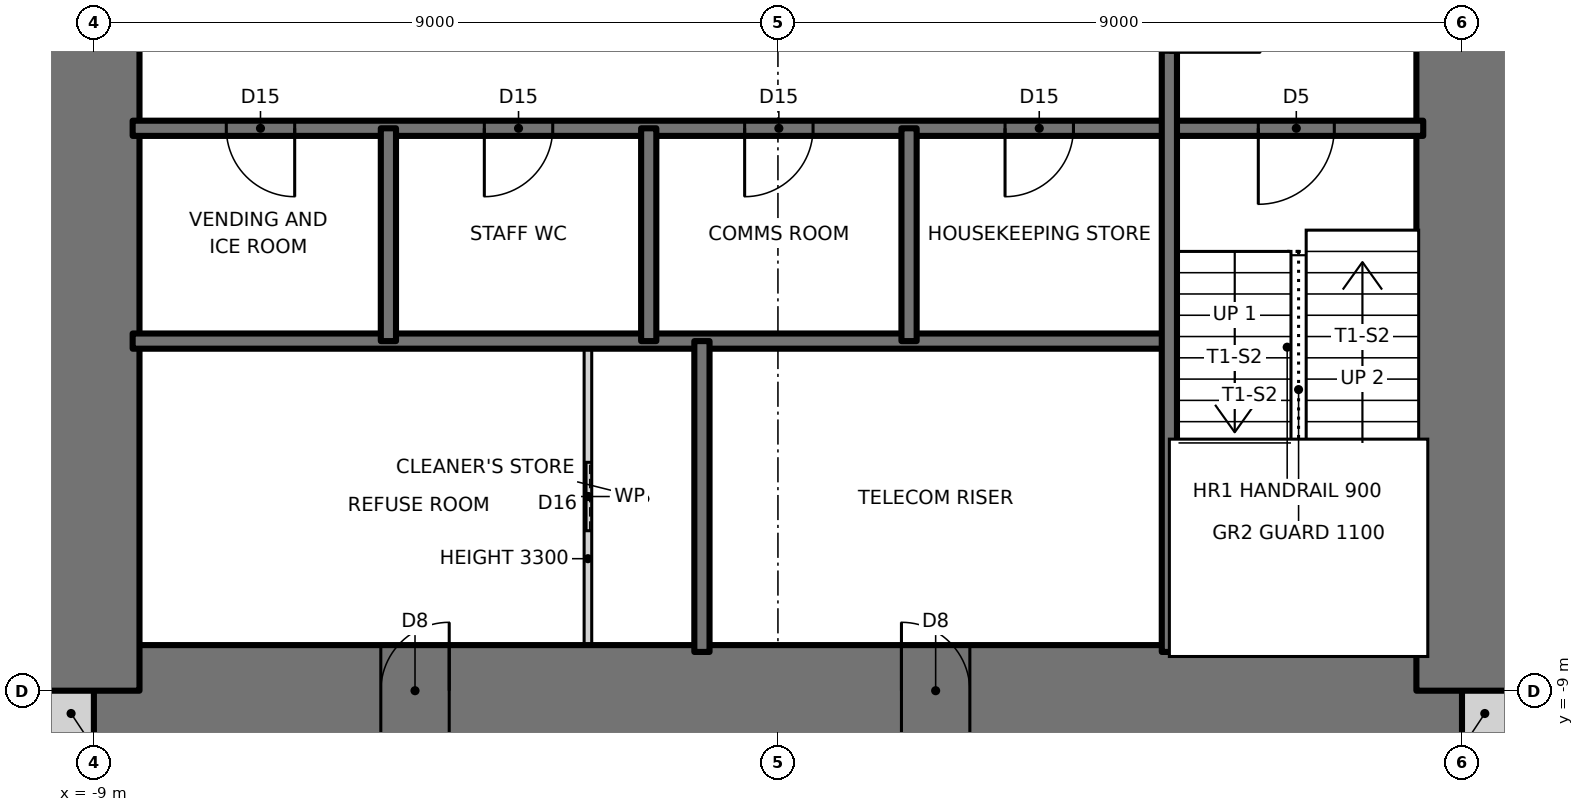
"""IFC4 building model, lengths in metres.
Left out: names, types, materials, properties, quantities, classifications, styles, units other than length and angle.
Written with IfcOpenShell. Run it as: python <this file> out.ifc"""

import sys

from ifc_helpers import new_model, si_unit, direction, frame, frame_2d, origin, place, context, subcontext, project, spatial, rectangle, extrude, element, fill, save


model = new_model("IFC4")
c1 = context("Model", 3, precision=1e-05, world=origin(), true_north=direction((0.0, 1.0)))
c2 = subcontext(c1, "Body", "Model", "MODEL_VIEW")
j1 = project(units=[si_unit("LENGTHUNIT", "METRE"), si_unit("PLANEANGLEUNIT", "RADIAN")], contexts=[c1])
p1 = place(None, origin())
s1 = spatial("IfcSite", under=j1, at=p1, CompositionType="ELEMENT")
p2 = place(p1, origin())
s2 = spatial("IfcBuilding", under=s1, at=p2, CompositionType="ELEMENT")
p3 = place(p2, frame((0.0, 0.0, 177.5)))
s3 = spatial("IfcBuildingStorey", under=s2, at=p3, CompositionType="ELEMENT", Elevation=177.5)
for number, where, z_axis, x_axis in (
    (1, (-9.6, -9.3, 0.0), (0.0, 0.0, 1.0), (1.0, 0.0, 0.0)),
    (2, (9.0, -9.3, 0.0), (0.0, 0.0, 1.0), (1.0, 0.0, 0.0)),
):
    element("IfcWall", number, at=place(p3, frame(where, z_axis=z_axis, x_axis=x_axis)), inside=s3, PredefinedType="SOLIDWALL", context=c2, shape_type="SweptSolid", body=[
        extrude(rectangle(XDim=0.6, YDim=0.6, at=frame_2d((0.3, 0.0))), origin(), (0.0, 0.0, 1.0), 3.5),
    ])
p4 = place(p3, frame((-9.0, -9.0, 0.0), z_axis=(0.0, 0.0, 1.0), x_axis=(1.0, 0.0, 0.0)))
e3 = element("IfcWall", 3, at=p4, inside=s3, PredefinedType="SHEAR", context=c2, shape_type="SweptSolid", body=[
    extrude(rectangle(XDim=18.0, YDim=1.2, at=frame_2d((9.0, 0.0))), origin(), (0.0, 0.0, 1.0), 3.5),
])
p5 = place(p4, frame((3.775, 0.0, 0.0)))
e4 = element("IfcOpeningElement", 4, at=p5, cuts=e3, PredefinedType="OPENING", context=c2, shape_type="SweptSolid", body=[
    extrude(rectangle(XDim=0.9, YDim=2.1, at=frame_2d((0.45, 1.05))), frame((0.0, 0.61, 0.0), z_axis=(0.0, -1.0, 0.0), x_axis=(1.0, 0.0, 0.0)), (0.0, 0.0, 1.0), 1.22),
])
p6 = place(p4, frame((10.625, 0.0, 0.0)))
e5 = element("IfcOpeningElement", 5, at=p6, cuts=e3, PredefinedType="OPENING", context=c2, shape_type="SweptSolid", body=[
    extrude(rectangle(XDim=0.9, YDim=2.1, at=frame_2d((0.45, 1.05))), frame((0.0, 0.61, 0.0), z_axis=(0.0, -1.0, 0.0), x_axis=(1.0, 0.0, 0.0)), (0.0, 0.0, 1.0), 1.22),
])
p7 = place(p3, frame((9.0, -9.0, 0.0), z_axis=(0.0, 0.0, 1.0), x_axis=(0.0, 1.0, 0.0)))
e6 = element("IfcWall", 6, at=p7, inside=s3, PredefinedType="SHEAR", context=c2, shape_type="SweptSolid", body=[
    extrude(rectangle(XDim=18.0, YDim=1.2, at=frame_2d((9.0, 0.0))), origin(), (0.0, 0.0, 1.0), 3.5),
])
p8 = place(p7, frame((8.5, 0.0, 0.0)))
e7 = element("IfcOpeningElement", 7, at=p8, cuts=e6, PredefinedType="OPENING", context=c2, shape_type="SweptSolid", body=[
    extrude(rectangle(XDim=1.0, YDim=2.1, at=frame_2d((0.5, 1.05))), frame((0.0, 0.61, 0.0), z_axis=(0.0, -1.0, 0.0), x_axis=(1.0, 0.0, 0.0)), (0.0, 0.0, 1.0), 1.22),
])
p9 = place(p3, frame((-9.0, 9.0, 0.0), z_axis=(0.0, 0.0, 1.0), x_axis=(0.0, -1.0, 0.0)))
e8 = element("IfcWall", 8, at=p9, inside=s3, PredefinedType="SHEAR", context=c2, shape_type="SweptSolid", body=[
    extrude(rectangle(XDim=18.0, YDim=1.2, at=frame_2d((9.0, 0.0))), origin(), (0.0, 0.0, 1.0), 3.5),
])
p10 = place(p9, frame((8.5, 0.0, 0.0)))
e9 = element("IfcOpeningElement", 9, at=p10, cuts=e8, PredefinedType="OPENING", context=c2, shape_type="SweptSolid", body=[
    extrude(rectangle(XDim=1.0, YDim=2.1, at=frame_2d((0.5, 1.05))), frame((0.0, 0.61, 0.0), z_axis=(0.0, -1.0, 0.0), x_axis=(1.0, 0.0, 0.0)), (0.0, 0.0, 1.0), 1.22),
])
p11 = place(p3, frame((-8.49, -4.4, 0.0), z_axis=(0.0, 0.0, 1.0), x_axis=(1.0, 0.0, 0.0)))
e10 = element("IfcWall", 10, at=p11, inside=s3, PredefinedType="SOLIDWALL", context=c2, shape_type="SweptSolid", body=[
    extrude(rectangle(XDim=13.64, YDim=0.2, at=frame_2d((6.82, 0.0))), origin(), (0.0, 0.0, 1.0), 3.5),
])
p12 = place(p3, frame((-8.49, -1.6, 0.0), z_axis=(0.0, 0.0, 1.0), x_axis=(1.0, 0.0, 0.0)))
e11 = element("IfcWall", 11, at=p12, inside=s3, PredefinedType="SOLIDWALL", context=c2, shape_type="SweptSolid", body=[
    extrude(rectangle(XDim=16.98, YDim=0.2, at=frame_2d((8.49, 0.0))), origin(), (0.0, 0.0, 1.0), 3.5),
])
p13 = place(p12, frame((14.81, 0.0, 0.0)))
e12 = element("IfcOpeningElement", 12, at=p13, cuts=e11, PredefinedType="OPENING", context=c2, shape_type="SweptSolid", body=[
    extrude(rectangle(XDim=1.0, YDim=2.1, at=frame_2d((0.5, 1.05))), frame((0.0, 0.11, 0.0), z_axis=(0.0, -1.0, 0.0), x_axis=(1.0, 0.0, 0.0)), (0.0, 0.0, 1.0), 0.22),
])
p14 = place(p12, frame((1.232, 0.0, 0.0)))
e13 = element("IfcOpeningElement", 13, at=p14, cuts=e11, PredefinedType="OPENING", context=c2, shape_type="SweptSolid", body=[
    extrude(rectangle(XDim=0.9, YDim=2.1, at=frame_2d((0.45, 1.05))), frame((0.0, 0.11, 0.0), z_axis=(0.0, -1.0, 0.0), x_axis=(1.0, 0.0, 0.0)), (0.0, 0.0, 1.0), 0.22),
])
p15 = place(p12, frame((4.627, 0.0, 0.0)))
e14 = element("IfcOpeningElement", 14, at=p15, cuts=e11, PredefinedType="OPENING", context=c2, shape_type="SweptSolid", body=[
    extrude(rectangle(XDim=0.9, YDim=2.1, at=frame_2d((0.45, 1.05))), frame((0.0, 0.11, 0.0), z_axis=(0.0, -1.0, 0.0), x_axis=(1.0, 0.0, 0.0)), (0.0, 0.0, 1.0), 0.22),
])
p16 = place(p12, frame((8.052, 0.0, 0.0)))
e15 = element("IfcOpeningElement", 15, at=p16, cuts=e11, PredefinedType="OPENING", context=c2, shape_type="SweptSolid", body=[
    extrude(rectangle(XDim=0.9, YDim=2.1, at=frame_2d((0.45, 1.05))), frame((0.0, 0.11, 0.0), z_axis=(0.0, -1.0, 0.0), x_axis=(1.0, 0.0, 0.0)), (0.0, 0.0, 1.0), 0.22),
])
p17 = place(p12, frame((11.478, 0.0, 0.0)))
e16 = element("IfcOpeningElement", 16, at=p17, cuts=e11, PredefinedType="OPENING", context=c2, shape_type="SweptSolid", body=[
    extrude(rectangle(XDim=0.9, YDim=2.1, at=frame_2d((0.45, 1.05))), frame((0.0, 0.11, 0.0), z_axis=(0.0, -1.0, 0.0), x_axis=(1.0, 0.0, 0.0)), (0.0, 0.0, 1.0), 0.22),
])
p18 = place(p3, frame((5.15, -8.49, 0.0), z_axis=(0.0, 0.0, 1.0), x_axis=(0.0, 1.0, 0.0)))
e17 = element("IfcWall", 17, at=p18, inside=s3, PredefinedType="SOLIDWALL", context=c2, shape_type="SweptSolid", body=[
    extrude(rectangle(XDim=13.09, YDim=0.2, at=frame_2d((6.545, 0.0))), origin(), (0.0, 0.0, 1.0), 3.5),
])
p19 = place(p18, frame((7.89, 0.0, 0.0)))
e18 = element("IfcOpeningElement", 18, at=p19, cuts=e17, PredefinedType="OPENING", context=c2, shape_type="SweptSolid", body=[
    extrude(rectangle(XDim=1.2, YDim=2.1, at=frame_2d((0.6, 1.05))), frame((0.0, 0.11, 0.0), z_axis=(0.0, -1.0, 0.0), x_axis=(1.0, 0.0, 0.0)), (0.0, 0.0, 1.0), 0.22),
])
p20 = place(p3, frame((1.725, -4.4, 0.0), z_axis=(0.0, 0.0, 1.0), x_axis=(0.0, 1.0, 0.0)))
e19 = element("IfcWall", 19, at=p20, inside=s3, PredefinedType="SOLIDWALL", context=c2, shape_type="SweptSolid", body=[
    extrude(rectangle(XDim=2.8, YDim=0.2, at=frame_2d((1.4, 0.0))), origin(), (0.0, 0.0, 1.0), 3.5),
])
p21 = place(p3, frame((-1.0, -8.49, 0.0), z_axis=(0.0, 0.0, 1.0), x_axis=(0.0, 1.0, 0.0)))
e20 = element("IfcWall", 20, at=p21, inside=s3, PredefinedType="SOLIDWALL", context=c2, shape_type="SweptSolid", body=[
    extrude(rectangle(XDim=4.09, YDim=0.2, at=frame_2d((2.045, 0.0))), origin(), (0.0, 0.0, 1.0), 3.5),
])
p22 = place(p3, frame((-1.7, -4.4, 0.0), z_axis=(0.0, 0.0, 1.0), x_axis=(0.0, 1.0, 0.0)))
e21 = element("IfcWall", 21, at=p22, inside=s3, PredefinedType="SOLIDWALL", context=c2, shape_type="SweptSolid", body=[
    extrude(rectangle(XDim=2.8, YDim=0.2, at=frame_2d((1.4, 0.0))), origin(), (0.0, 0.0, 1.0), 3.5),
])
p23 = place(p3, frame((-2.5, -8.49, 0.0), z_axis=(0.0, 0.0, 1.0), x_axis=(0.0, 1.0, 0.0)))
e22 = element("IfcWall", 22, at=p23, inside=s3, PredefinedType="PARTITIONING", context=c2, shape_type="SweptSolid", body=[
    extrude(rectangle(XDim=4.09, YDim=0.1, at=frame_2d((2.045, 0.0))), origin(), (0.0, 0.0, 1.0), 3.3),
])
p24 = place(p23, frame((1.595, 0.0, 0.0)))
e23 = element("IfcOpeningElement", 23, at=p24, cuts=e22, PredefinedType="OPENING", context=c2, shape_type="SweptSolid", body=[
    extrude(rectangle(XDim=0.9, YDim=2.1, at=frame_2d((0.45, 1.05))), frame((0.0, 0.06, 0.0), z_axis=(0.0, -1.0, 0.0), x_axis=(1.0, 0.0, 0.0)), (0.0, 0.0, 1.0), 0.12),
])
p25 = place(p3, frame((-5.125, -4.4, 0.0), z_axis=(0.0, 0.0, 1.0), x_axis=(0.0, 1.0, 0.0)))
e24 = element("IfcWall", 24, at=p25, inside=s3, PredefinedType="SOLIDWALL", context=c2, shape_type="SweptSolid", body=[
    extrude(rectangle(XDim=2.8, YDim=0.2, at=frame_2d((1.4, 0.0))), origin(), (0.0, 0.0, 1.0), 3.5),
])
p26 = place(p13, frame((1.0, 0.0, 0.0), z_axis=(0.0, 0.0, 1.0), x_axis=(-1.0, 0.0, 0.0)))
e25 = element("IfcDoor", 25, at=p26, inside=s3, OperationType="SINGLE_SWING_RIGHT", PredefinedType="DOOR", context=c2, shape_type="SweptSolid", body=[
    extrude(rectangle(XDim=1.0, YDim=2.1, at=frame_2d((0.5, 1.05))), frame((0.0, 0.025, 0.0), z_axis=(0.0, -1.0, 0.0), x_axis=(1.0, 0.0, 0.0)), (0.0, 0.0, 1.0), 0.05),
])
fill(e12, e25)
p27 = place(p19, frame((1.2, 0.0, 0.0), z_axis=(0.0, 0.0, 1.0), x_axis=(-1.0, 0.0, 0.0)))
e26 = element("IfcDoor", 26, at=p27, inside=s3, OperationType="SINGLE_SWING_RIGHT", PredefinedType="DOOR", context=c2, shape_type="SweptSolid", body=[
    extrude(rectangle(XDim=1.2, YDim=2.1, at=frame_2d((0.6, 1.05))), frame((0.0, 0.025, 0.0), z_axis=(0.0, -1.0, 0.0), x_axis=(1.0, 0.0, 0.0)), (0.0, 0.0, 1.0), 0.05),
])
fill(e18, e26)
p28 = place(p14, frame((0.9, 0.0, 0.0), z_axis=(0.0, 0.0, 1.0), x_axis=(-1.0, 0.0, 0.0)))
e27 = element("IfcDoor", 27, at=p28, inside=s3, OperationType="SINGLE_SWING_LEFT", PredefinedType="DOOR", context=c2, shape_type="SweptSolid", body=[
    extrude(rectangle(XDim=0.9, YDim=2.1, at=frame_2d((0.45, 1.05))), frame((0.0, 0.025, 0.0), z_axis=(0.0, -1.0, 0.0), x_axis=(1.0, 0.0, 0.0)), (0.0, 0.0, 1.0), 0.05),
])
fill(e13, e27)
p29 = place(p15, frame((0.9, 0.0, 0.0), z_axis=(0.0, 0.0, 1.0), x_axis=(-1.0, 0.0, 0.0)))
e28 = element("IfcDoor", 28, at=p29, inside=s3, OperationType="SINGLE_SWING_RIGHT", PredefinedType="DOOR", context=c2, shape_type="SweptSolid", body=[
    extrude(rectangle(XDim=0.9, YDim=2.1, at=frame_2d((0.45, 1.05))), frame((0.0, 0.025, 0.0), z_axis=(0.0, -1.0, 0.0), x_axis=(1.0, 0.0, 0.0)), (0.0, 0.0, 1.0), 0.05),
])
fill(e14, e28)
p30 = place(p16, frame((0.9, 0.0, 0.0), z_axis=(0.0, 0.0, 1.0), x_axis=(-1.0, 0.0, 0.0)))
e29 = element("IfcDoor", 29, at=p30, inside=s3, OperationType="SINGLE_SWING_RIGHT", PredefinedType="DOOR", context=c2, shape_type="SweptSolid", body=[
    extrude(rectangle(XDim=0.9, YDim=2.1, at=frame_2d((0.45, 1.05))), frame((0.0, 0.025, 0.0), z_axis=(0.0, -1.0, 0.0), x_axis=(1.0, 0.0, 0.0)), (0.0, 0.0, 1.0), 0.05),
])
fill(e15, e29)
p31 = place(p17, frame((0.9, 0.0, 0.0), z_axis=(0.0, 0.0, 1.0), x_axis=(-1.0, 0.0, 0.0)))
e30 = element("IfcDoor", 30, at=p31, inside=s3, OperationType="SINGLE_SWING_RIGHT", PredefinedType="DOOR", context=c2, shape_type="SweptSolid", body=[
    extrude(rectangle(XDim=0.9, YDim=2.1, at=frame_2d((0.45, 1.05))), frame((0.0, 0.025, 0.0), z_axis=(0.0, -1.0, 0.0), x_axis=(1.0, 0.0, 0.0)), (0.0, 0.0, 1.0), 0.05),
])
fill(e16, e30)
p32 = place(p24, origin())
e31 = element("IfcDoor", 31, at=p32, inside=s3, OperationType="SLIDING_TO_LEFT", PredefinedType="DOOR", context=c2, shape_type="SweptSolid", body=[
    extrude(rectangle(XDim=0.9, YDim=2.1, at=frame_2d((0.45, 1.05))), frame((0.0, 0.025, 0.0), z_axis=(0.0, -1.0, 0.0), x_axis=(1.0, 0.0, 0.0)), (0.0, 0.0, 1.0), 0.05),
])
fill(e23, e31)
p33 = place(p5, origin())
e32 = element("IfcDoor", 32, at=p33, inside=s3, OperationType="SINGLE_SWING_RIGHT", PredefinedType="DOOR", context=c2, shape_type="SweptSolid", body=[
    extrude(rectangle(XDim=0.9, YDim=2.1, at=frame_2d((0.45, 1.05))), frame((0.0, 0.025, 0.0), z_axis=(0.0, -1.0, 0.0), x_axis=(1.0, 0.0, 0.0)), (0.0, 0.0, 1.0), 0.05),
])
fill(e4, e32)
p34 = place(p6, origin())
e33 = element("IfcDoor", 33, at=p34, inside=s3, OperationType="SINGLE_SWING_LEFT", PredefinedType="DOOR", context=c2, shape_type="SweptSolid", body=[
    extrude(rectangle(XDim=0.9, YDim=2.1, at=frame_2d((0.45, 1.05))), frame((0.0, 0.025, 0.0), z_axis=(0.0, -1.0, 0.0), x_axis=(1.0, 0.0, 0.0)), (0.0, 0.0, 1.0), 0.05),
])
fill(e5, e33)
save(model, sys.argv[1])
